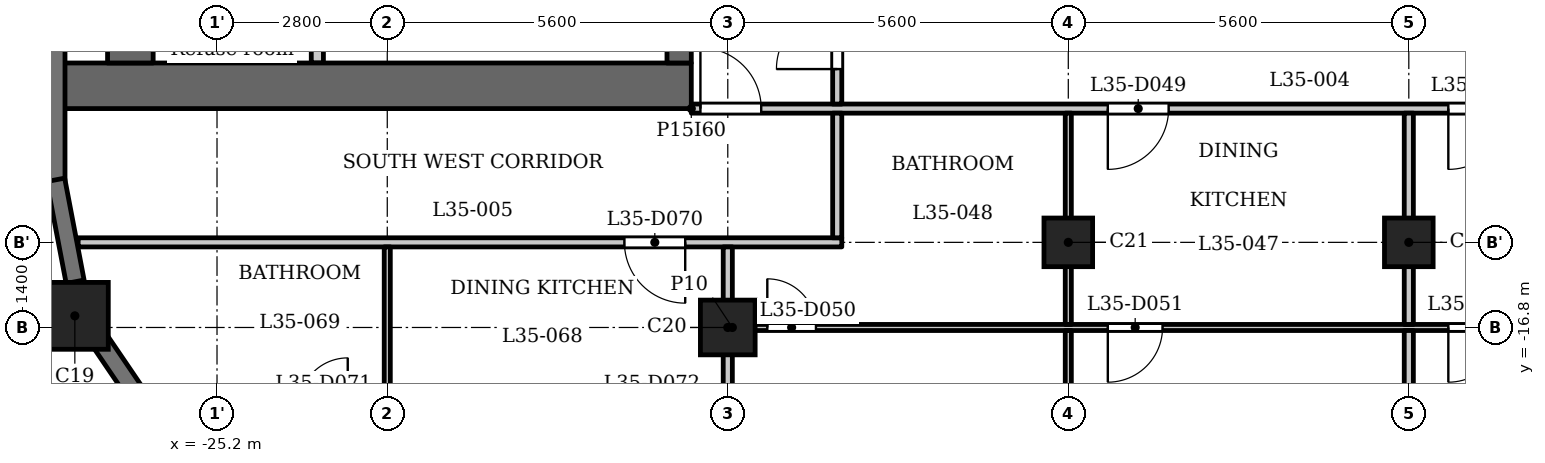
"""IFC4 building model, lengths in metres.
Left out: names, types, materials, properties, quantities, classifications, styles, units other than length and angle.
Written with IfcOpenShell. Run it as: python <this file> out.ifc"""

import sys

from ifc_helpers import new_model, si_unit, direction, frame, frame_2d, origin, origin_2d, place, context, subcontext, project, spatial, rectangle, extrude, element, fill, save


model = new_model("IFC4")
c1 = context("Model", 3, precision=1e-05, world=origin(), true_north=direction((0.0, 1.0)))
c2 = subcontext(c1, "Body", "Model", "MODEL_VIEW")
j1 = project(units=[si_unit("LENGTHUNIT", "METRE"), si_unit("PLANEANGLEUNIT", "RADIAN")], contexts=[c1])
p1 = place(None, origin())
s1 = spatial("IfcSite", under=j1, at=p1, CompositionType="ELEMENT")
p2 = place(p1, origin())
s2 = spatial("IfcBuilding", under=s1, at=p2, CompositionType="ELEMENT")
p3 = place(p2, frame((0.0, 0.0, 139.6)))
s3 = spatial("IfcBuildingStorey", under=s2, at=p3, CompositionType="ELEMENT", Elevation=139.6)
p4 = place(p3, frame((-27.538, -16.609, 0.0), z_axis=(0.0, 0.0, 1.0), x_axis=(1.0, 0.0, 0.0)))
e1 = element("IfcColumn", 1, at=p4, inside=s3, PredefinedType="COLUMN", context=c2, shape_type="SweptSolid", body=[
    extrude(rectangle(XDim=1.1, YDim=1.1, at=origin_2d()), origin(), (0.0, 0.0, 1.0), 3.5),
])
p5 = place(p3, frame((-16.8, -16.8, 0.0), z_axis=(0.0, 0.0, 1.0), x_axis=(1.0, 0.0, 0.0)))
e2 = element("IfcColumn", 2, at=p5, inside=s3, PredefinedType="COLUMN", context=c2, shape_type="SweptSolid", body=[
    extrude(rectangle(XDim=0.9, YDim=0.9, at=origin_2d()), origin(), (0.0, 0.0, 1.0), 3.5),
])
for number, where, z_axis, x_axis in (
    (3, (-11.2, -15.4, 0.0), (0.0, 0.0, 1.0), (1.0, 0.0, 0.0)),
    (4, (-5.6, -15.4, 0.0), (0.0, 0.0, 1.0), (1.0, 0.0, 0.0)),
):
    element("IfcColumn", number, at=place(p3, frame(where, z_axis=z_axis, x_axis=x_axis)), inside=s3, PredefinedType="COLUMN", context=c2, shape_type="SweptSolid", body=[
        extrude(rectangle(XDim=0.8, YDim=0.8, at=origin_2d()), origin(), (0.0, 0.0, 1.0), 3.5),
    ])
p6 = place(p3, frame((-27.85, -11.75, 0.0), z_axis=(0.0, 0.0, 1.0), x_axis=(0.0, -1.0, 0.0)))
e5 = element("IfcWall", 5, at=p6, inside=s3, PredefinedType="SOLIDWALL", context=c2, shape_type="SweptSolid", body=[
    extrude(rectangle(XDim=2.65, YDim=0.3, at=frame_2d((1.325, 0.0))), origin(), (0.0, 0.0, 1.0), 2.45),
])
p7 = place(p3, frame((-27.853, -14.372, 0.0), z_axis=(0.0, 0.0, 1.0), x_axis=(0.187302784601, -0.982302227871, 0.0)))
e6 = element("IfcWall", 6, at=p7, inside=s3, PredefinedType="SOLIDWALL", context=c2, shape_type="SweptSolid", body=[
    extrude(rectangle(XDim=1.706, YDim=0.3, at=frame_2d((0.853, 0.0))), origin(), (0.0, 0.0, 1.0), 2.45),
])
p8 = place(p3, frame((-27.138, -17.002, 0.0), z_axis=(0.0, 0.0, 1.0), x_axis=(0.562075160946, -0.827086158419, 0.0)))
e7 = element("IfcWall", 7, at=p8, inside=s3, PredefinedType="SOLIDWALL", context=c2, shape_type="SweptSolid", body=[
    extrude(rectangle(XDim=1.706, YDim=0.3, at=frame_2d((0.853, 0.0))), origin(), (0.0, 0.0, 1.0), 2.45),
])
p9 = place(p3, frame((-17.4, -12.825, 0.0), z_axis=(0.0, 0.0, 1.0), x_axis=(-1.0, 0.0, 0.0)))
e8 = element("IfcWall", 8, at=p9, inside=s3, PredefinedType="SHEAR", context=c2, shape_type="SweptSolid", body=[
    extrude(rectangle(XDim=10.4, YDim=0.75, at=frame_2d((5.2, 0.0))), origin(), (0.0, 0.0, 1.0), 3.2),
])
p10 = place(p3, frame((-17.6, -12.45, 0.0), z_axis=(0.0, 0.0, 1.0), x_axis=(0.0, 1.0, 0.0)))
e9 = element("IfcWall", 9, at=p10, inside=s3, PredefinedType="SHEAR", context=c2, shape_type="SweptSolid", body=[
    extrude(rectangle(XDim=24.9, YDim=0.4, at=frame_2d((12.45, 0.0))), origin(), (0.0, 0.0, 1.0), 3.2),
])
p11 = place(p10, frame((8.65, 0.0, 0.0)))
e10 = element("IfcOpeningElement", 10, at=p11, cuts=e9, PredefinedType="OPENING", context=c2, shape_type="SweptSolid", body=[
    extrude(rectangle(XDim=0.9, YDim=2.1, at=frame_2d((0.45, 1.05))), frame((0.0, 0.21, 0.0), z_axis=(0.0, -1.0, 0.0), x_axis=(1.0, 0.0, 0.0)), (0.0, 0.0, 1.0), 0.42),
])
p12 = place(p10, frame((15.6, 0.0, 0.0)))
e11 = element("IfcOpeningElement", 11, at=p12, cuts=e9, PredefinedType="OPENING", context=c2, shape_type="SweptSolid", body=[
    extrude(rectangle(XDim=1.1, YDim=2.1, at=frame_2d((0.55, 1.05))), frame((0.0, 0.21, 0.0), z_axis=(0.0, -1.0, 0.0), x_axis=(1.0, 0.0, 0.0)), (0.0, 0.0, 1.0), 0.42),
])
p13 = place(p10, frame((18.0, 0.0, 0.0)))
e12 = element("IfcOpeningElement", 12, at=p13, cuts=e9, PredefinedType="OPENING", context=c2, shape_type="SweptSolid", body=[
    extrude(rectangle(XDim=1.1, YDim=2.1, at=frame_2d((0.55, 1.05))), frame((0.0, 0.21, 0.0), z_axis=(0.0, -1.0, 0.0), x_axis=(1.0, 0.0, 0.0)), (0.0, 0.0, 1.0), 0.42),
])
p14 = place(p10, frame((23.025, 0.0, 0.0)))
e13 = element("IfcOpeningElement", 13, at=p14, cuts=e9, PredefinedType="OPENING", context=c2, shape_type="SweptSolid", body=[
    extrude(rectangle(XDim=1.1, YDim=2.1, at=frame_2d((0.55, 1.05))), frame((0.0, 0.21, 0.0), z_axis=(0.0, -1.0, 0.0), x_axis=(1.0, 0.0, 0.0)), (0.0, 0.0, 1.0), 0.42),
])
p15 = place(p10, frame((0.775, 0.0, 0.0)))
e14 = element("IfcOpeningElement", 14, at=p15, cuts=e9, PredefinedType="OPENING", context=c2, shape_type="SweptSolid", body=[
    extrude(rectangle(XDim=1.1, YDim=2.1, at=frame_2d((0.55, 1.05))), frame((0.0, 0.21, 0.0), z_axis=(0.0, -1.0, 0.0), x_axis=(1.0, 0.0, 0.0)), (0.0, 0.0, 1.0), 0.42),
])
p16 = place(p10, frame((12.925, 0.0, 0.0)))
e15 = element("IfcOpeningElement", 15, at=p16, cuts=e9, PredefinedType="OPENING", context=c2, shape_type="SweptSolid", body=[
    extrude(rectangle(XDim=1.8, YDim=2.1, at=frame_2d((0.9, 1.05))), frame((0.0, 0.21, 0.0), z_axis=(0.0, -1.0, 0.0), x_axis=(1.0, 0.0, 0.0)), (0.0, 0.0, 1.0), 0.42),
])
p17 = place(p3, frame((-26.625, -12.45, 0.0), z_axis=(0.0, 0.0, 1.0), x_axis=(0.0, 1.0, 0.0)))
e16 = element("IfcWall", 16, at=p17, inside=s3, PredefinedType="SHEAR", context=c2, shape_type="SweptSolid", body=[
    extrude(rectangle(XDim=24.9, YDim=0.75, at=frame_2d((12.45, 0.0))), origin(), (0.0, 0.0, 1.0), 3.2),
])
p18 = place(p3, frame((-23.55, -12.45, 0.0), z_axis=(0.0, 0.0, 1.0), x_axis=(0.0, 1.0, 0.0)))
e17 = element("IfcWall", 17, at=p18, inside=s3, PredefinedType="PARTITIONING", context=c2, shape_type="SweptSolid", body=[
    extrude(rectangle(XDim=2.65, YDim=0.2, at=frame_2d((1.325, 0.0))), origin(), (0.0, 0.0, 1.0), 3.2),
])
p19 = place(p18, frame((0.875, 0.0, 0.0)))
e18 = element("IfcOpeningElement", 18, at=p19, cuts=e17, PredefinedType="OPENING", context=c2, shape_type="SweptSolid", body=[
    extrude(rectangle(XDim=0.9, YDim=2.1, at=frame_2d((0.45, 1.05))), frame((0.0, 0.11, 0.0), z_axis=(0.0, -1.0, 0.0), x_axis=(1.0, 0.0, 0.0)), (0.0, 0.0, 1.0), 0.22),
])
p20 = place(p3, frame((-16.725, -16.8, 0.0), z_axis=(0.0, 0.0, 1.0), x_axis=(1.0, 0.0, 0.0)))
e19 = element("IfcWall", 19, at=p20, inside=s3, PredefinedType="PARTITIONING", context=c2, shape_type="SweptSolid", body=[
    extrude(rectangle(XDim=33.45, YDim=0.1, at=frame_2d((16.725, 0.0))), origin(), (0.0, 0.0, 1.0), 3.2),
])
p21 = place(p20, frame((0.575, 0.0, 0.0)))
e20 = element("IfcOpeningElement", 20, at=p21, cuts=e19, PredefinedType="OPENING", context=c2, shape_type="SweptSolid", body=[
    extrude(rectangle(XDim=0.8, YDim=2.1, at=frame_2d((0.4, 1.05))), frame((0.0, 0.06, 0.0), z_axis=(0.0, -1.0, 0.0), x_axis=(1.0, 0.0, 0.0)), (0.0, 0.0, 1.0), 0.12),
])
p22 = place(p20, frame((6.175, 0.0, 0.0)))
e21 = element("IfcOpeningElement", 21, at=p22, cuts=e19, PredefinedType="OPENING", context=c2, shape_type="SweptSolid", body=[
    extrude(rectangle(XDim=0.9, YDim=2.1, at=frame_2d((0.45, 1.05))), frame((0.0, 0.06, 0.0), z_axis=(0.0, -1.0, 0.0), x_axis=(1.0, 0.0, 0.0)), (0.0, 0.0, 1.0), 0.12),
])
p23 = place(p20, frame((15.275, 0.0, 0.0)))
e22 = element("IfcOpeningElement", 22, at=p23, cuts=e19, PredefinedType="OPENING", context=c2, shape_type="SweptSolid", body=[
    extrude(rectangle(XDim=0.8, YDim=2.1, at=frame_2d((0.4, 1.05))), frame((0.0, 0.06, 0.0), z_axis=(0.0, -1.0, 0.0), x_axis=(1.0, 0.0, 0.0)), (0.0, 0.0, 1.0), 0.12),
])
p24 = place(p20, frame((11.775, 0.0, 0.0)))
e23 = element("IfcOpeningElement", 23, at=p24, cuts=e19, PredefinedType="OPENING", context=c2, shape_type="SweptSolid", body=[
    extrude(rectangle(XDim=0.9, YDim=2.1, at=frame_2d((0.45, 1.05))), frame((0.0, 0.06, 0.0), z_axis=(0.0, -1.0, 0.0), x_axis=(1.0, 0.0, 0.0)), (0.0, 0.0, 1.0), 0.12),
])
p25 = place(p20, frame((17.275, 0.0, 0.0)))
e24 = element("IfcOpeningElement", 24, at=p25, cuts=e19, PredefinedType="OPENING", context=c2, shape_type="SweptSolid", body=[
    extrude(rectangle(XDim=0.8, YDim=2.1, at=frame_2d((0.4, 1.05))), frame((0.0, 0.06, 0.0), z_axis=(0.0, -1.0, 0.0), x_axis=(1.0, 0.0, 0.0)), (0.0, 0.0, 1.0), 0.12),
])
p26 = place(p20, frame((20.775, 0.0, 0.0)))
e25 = element("IfcOpeningElement", 25, at=p26, cuts=e19, PredefinedType="OPENING", context=c2, shape_type="SweptSolid", body=[
    extrude(rectangle(XDim=0.9, YDim=2.1, at=frame_2d((0.45, 1.05))), frame((0.0, 0.06, 0.0), z_axis=(0.0, -1.0, 0.0), x_axis=(1.0, 0.0, 0.0)), (0.0, 0.0, 1.0), 0.12),
])
p27 = place(p20, frame((31.575, 0.0, 0.0)))
e26 = element("IfcOpeningElement", 26, at=p27, cuts=e19, PredefinedType="OPENING", context=c2, shape_type="SweptSolid", body=[
    extrude(rectangle(XDim=0.8, YDim=2.1, at=frame_2d((0.4, 1.05))), frame((0.0, 0.06, 0.0), z_axis=(0.0, -1.0, 0.0), x_axis=(1.0, 0.0, 0.0)), (0.0, 0.0, 1.0), 0.12),
])
p28 = place(p20, frame((28.575, 0.0, 0.0)))
e27 = element("IfcOpeningElement", 27, at=p28, cuts=e19, PredefinedType="OPENING", context=c2, shape_type="SweptSolid", body=[
    extrude(rectangle(XDim=0.9, YDim=2.1, at=frame_2d((0.45, 1.05))), frame((0.0, 0.06, 0.0), z_axis=(0.0, -1.0, 0.0), x_axis=(1.0, 0.0, 0.0)), (0.0, 0.0, 1.0), 0.12),
])
p29 = place(p20, frame((23.725, 0.0, 0.0)))
e28 = element("IfcOpeningElement", 28, at=p29, cuts=e19, PredefinedType="OPENING", context=c2, shape_type="SweptSolid", body=[
    extrude(rectangle(XDim=0.9, YDim=2.1, at=frame_2d((0.45, 1.05))), frame((0.0, 0.06, 0.0), z_axis=(0.0, -1.0, 0.0), x_axis=(1.0, 0.0, 0.0)), (0.0, 0.0, 1.0), 0.12),
])
p30 = place(p20, frame((26.225, 0.0, 0.0)))
e29 = element("IfcOpeningElement", 29, at=p30, cuts=e19, PredefinedType="OPENING", context=c2, shape_type="SweptSolid", body=[
    extrude(rectangle(XDim=0.9, YDim=2.1, at=frame_2d((0.45, 1.05))), frame((0.0, 0.06, 0.0), z_axis=(0.0, -1.0, 0.0), x_axis=(1.0, 0.0, 0.0)), (0.0, 0.0, 1.0), 0.12),
])
p31 = place(p3, frame((-27.484, -15.4, 0.0), z_axis=(0.0, 0.0, 1.0), x_axis=(1.0, 0.0, 0.0)))
e30 = element("IfcWall", 30, at=p31, inside=s3, PredefinedType="PARTITIONING", context=c2, shape_type="SweptSolid", body=[
    extrude(rectangle(XDim=12.559, YDim=0.15, at=frame_2d((6.279, 0.0))), origin(), (0.0, 0.0, 1.0), 3.2),
])
p32 = place(p31, frame((8.984, 0.0, 0.0)))
e31 = element("IfcOpeningElement", 31, at=p32, cuts=e30, PredefinedType="OPENING", context=c2, shape_type="SweptSolid", body=[
    extrude(rectangle(XDim=1.0, YDim=2.1, at=frame_2d((0.5, 1.05))), frame((0.0, 0.085, 0.0), z_axis=(0.0, -1.0, 0.0), x_axis=(1.0, 0.0, 0.0)), (0.0, 0.0, 1.0), 0.17),
])
p33 = place(p3, frame((-17.4, -13.2, 0.0), z_axis=(0.0, 0.0, 1.0), x_axis=(1.0, 0.0, 0.0)))
e32 = element("IfcWall", 32, at=p33, inside=s3, PredefinedType="PARTITIONING", context=c2, shape_type="SweptSolid", body=[
    extrude(rectangle(XDim=34.8, YDim=0.15, at=frame_2d((17.4, 0.0))), origin(), (0.0, 0.0, 1.0), 3.2),
])
p34 = place(p33, frame((0.15, 0.0, 0.0)))
e33 = element("IfcOpeningElement", 33, at=p34, cuts=e32, PredefinedType="OPENING", context=c2, shape_type="SweptSolid", body=[
    extrude(rectangle(XDim=1.0, YDim=2.1, at=frame_2d((0.5, 1.05))), frame((0.0, 0.085, 0.0), z_axis=(0.0, -1.0, 0.0), x_axis=(1.0, 0.0, 0.0)), (0.0, 0.0, 1.0), 0.17),
])
p35 = place(p33, frame((33.55, 0.0, 0.0)))
e34 = element("IfcOpeningElement", 34, at=p35, cuts=e32, PredefinedType="OPENING", context=c2, shape_type="SweptSolid", body=[
    extrude(rectangle(XDim=1.0, YDim=2.1, at=frame_2d((0.5, 1.05))), frame((0.0, 0.085, 0.0), z_axis=(0.0, -1.0, 0.0), x_axis=(1.0, 0.0, 0.0)), (0.0, 0.0, 1.0), 0.17),
])
p36 = place(p33, frame((6.85, 0.0, 0.0)))
e35 = element("IfcOpeningElement", 35, at=p36, cuts=e32, PredefinedType="OPENING", context=c2, shape_type="SweptSolid", body=[
    extrude(rectangle(XDim=1.0, YDim=2.1, at=frame_2d((0.5, 1.05))), frame((0.0, 0.085, 0.0), z_axis=(0.0, -1.0, 0.0), x_axis=(1.0, 0.0, 0.0)), (0.0, 0.0, 1.0), 0.17),
])
p37 = place(p33, frame((12.45, 0.0, 0.0)))
e36 = element("IfcOpeningElement", 36, at=p37, cuts=e32, PredefinedType="OPENING", context=c2, shape_type="SweptSolid", body=[
    extrude(rectangle(XDim=1.0, YDim=2.1, at=frame_2d((0.5, 1.05))), frame((0.0, 0.085, 0.0), z_axis=(0.0, -1.0, 0.0), x_axis=(1.0, 0.0, 0.0)), (0.0, 0.0, 1.0), 0.17),
])
p38 = place(p33, frame((21.3, 0.0, 0.0)))
e37 = element("IfcOpeningElement", 37, at=p38, cuts=e32, PredefinedType="OPENING", context=c2, shape_type="SweptSolid", body=[
    extrude(rectangle(XDim=1.0, YDim=2.1, at=frame_2d((0.5, 1.05))), frame((0.0, 0.085, 0.0), z_axis=(0.0, -1.0, 0.0), x_axis=(1.0, 0.0, 0.0)), (0.0, 0.0, 1.0), 0.17),
])
p39 = place(p33, frame((26.9, 0.0, 0.0)))
e38 = element("IfcOpeningElement", 38, at=p39, cuts=e32, PredefinedType="OPENING", context=c2, shape_type="SweptSolid", body=[
    extrude(rectangle(XDim=1.0, YDim=2.1, at=frame_2d((0.5, 1.05))), frame((0.0, 0.085, 0.0), z_axis=(0.0, -1.0, 0.0), x_axis=(1.0, 0.0, 0.0)), (0.0, 0.0, 1.0), 0.17),
])
p40 = place(p3, frame((-22.4, -18.05, 0.0), z_axis=(0.0, 0.0, 1.0), x_axis=(0.0, 1.0, 0.0)))
e39 = element("IfcWall", 39, at=p40, inside=s3, PredefinedType="PARTITIONING", context=c2, shape_type="SweptSolid", body=[
    extrude(rectangle(XDim=2.575, YDim=0.1, at=frame_2d((1.288, 0.0))), origin(), (0.0, 0.0, 1.0), 3.2),
])
p41 = place(p3, frame((-16.8, -22.93, 0.0), z_axis=(0.0, 0.0, 1.0), x_axis=(0.0, 1.0, 0.0)))
e40 = element("IfcWall", 40, at=p41, inside=s3, PredefinedType="PARTITIONING", context=c2, shape_type="SweptSolid", body=[
    extrude(rectangle(XDim=7.455, YDim=0.15, at=frame_2d((3.728, 0.0))), origin(), (0.0, 0.0, 1.0), 3.2),
])
p42 = place(p3, frame((-15.0, -15.325, 0.0), z_axis=(0.0, 0.0, 1.0), x_axis=(0.0, 1.0, 0.0)))
e41 = element("IfcWall", 41, at=p42, inside=s3, PredefinedType="PARTITIONING", context=c2, shape_type="SweptSolid", body=[
    extrude(rectangle(XDim=2.05, YDim=0.15, at=frame_2d((1.025, 0.0))), origin(), (0.0, 0.0, 1.0), 3.2),
])
p43 = place(p3, frame((-15.0, -13.125, 0.0), z_axis=(0.0, 0.0, 1.0), x_axis=(0.0, 1.0, 0.0)))
e42 = element("IfcWall", 42, at=p43, inside=s3, PredefinedType="PARTITIONING", context=c2, shape_type="SweptSolid", body=[
    extrude(rectangle(XDim=6.356, YDim=0.15, at=frame_2d((3.178, 0.0))), origin(), (0.0, 0.0, 1.0), 3.2),
])
p44 = place(p43, frame((0.575, 0.0, 0.0)))
e43 = element("IfcOpeningElement", 43, at=p44, cuts=e42, PredefinedType="OPENING", context=c2, shape_type="SweptSolid", body=[
    extrude(rectangle(XDim=1.0, YDim=2.1, at=frame_2d((0.5, 1.05))), frame((0.0, 0.085, 0.0), z_axis=(0.0, -1.0, 0.0), x_axis=(1.0, 0.0, 0.0)), (0.0, 0.0, 1.0), 0.17),
])
p45 = place(p3, frame((-11.2, -22.93, 0.0), z_axis=(0.0, 0.0, 1.0), x_axis=(0.0, 1.0, 0.0)))
e44 = element("IfcWall", 44, at=p45, inside=s3, PredefinedType="PARTITIONING", context=c2, shape_type="SweptSolid", body=[
    extrude(rectangle(XDim=6.08, YDim=0.1, at=frame_2d((3.04, 0.0))), origin(), (0.0, 0.0, 1.0), 3.2),
])
p46 = place(p45, frame((1.33, 0.0, 0.0)))
e45 = element("IfcOpeningElement", 45, at=p46, cuts=e44, PredefinedType="OPENING", context=c2, shape_type="SweptSolid", body=[
    extrude(rectangle(XDim=0.9, YDim=2.1, at=frame_2d((0.45, 1.05))), frame((0.0, 0.06, 0.0), z_axis=(0.0, -1.0, 0.0), x_axis=(1.0, 0.0, 0.0)), (0.0, 0.0, 1.0), 0.12),
])
p47 = place(p3, frame((-11.2, -16.75, 0.0), z_axis=(0.0, 0.0, 1.0), x_axis=(0.0, 1.0, 0.0)))
e46 = element("IfcWall", 46, at=p47, inside=s3, PredefinedType="PARTITIONING", context=c2, shape_type="SweptSolid", body=[
    extrude(rectangle(XDim=3.475, YDim=0.1, at=frame_2d((1.738, 0.0))), origin(), (0.0, 0.0, 1.0), 3.2),
])
p48 = place(p3, frame((-5.6, -22.93, 0.0), z_axis=(0.0, 0.0, 1.0), x_axis=(0.0, 1.0, 0.0)))
e47 = element("IfcWall", 47, at=p48, inside=s3, PredefinedType="PARTITIONING", context=c2, shape_type="SweptSolid", body=[
    extrude(rectangle(XDim=6.08, YDim=0.15, at=frame_2d((3.04, 0.0))), origin(), (0.0, 0.0, 1.0), 3.2),
])
p49 = place(p3, frame((-5.6, -16.75, 0.0), z_axis=(0.0, 0.0, 1.0), x_axis=(0.0, 1.0, 0.0)))
e48 = element("IfcWall", 48, at=p49, inside=s3, PredefinedType="PARTITIONING", context=c2, shape_type="SweptSolid", body=[
    extrude(rectangle(XDim=3.475, YDim=0.15, at=frame_2d((1.738, 0.0))), origin(), (0.0, 0.0, 1.0), 3.2),
])
p50 = place(p44, origin())
e49 = element("IfcDoor", 49, at=p50, inside=s3, OperationType="SINGLE_SWING_RIGHT", PredefinedType="DOOR", context=c2, shape_type="SweptSolid", body=[
    extrude(rectangle(XDim=1.0, YDim=2.1, at=frame_2d((0.5, 1.05))), frame((0.0, 0.025, 0.0), z_axis=(0.0, -1.0, 0.0), x_axis=(1.0, 0.0, 0.0)), (0.0, 0.0, 1.0), 0.05),
])
fill(e43, e49)
p51 = place(p34, origin())
e50 = element("IfcDoor", 50, at=p51, inside=s3, OperationType="SINGLE_SWING_RIGHT", PredefinedType="DOOR", context=c2, shape_type="SweptSolid", body=[
    extrude(rectangle(XDim=1.0, YDim=2.1, at=frame_2d((0.5, 1.05))), frame((0.0, 0.025, 0.0), z_axis=(0.0, -1.0, 0.0), x_axis=(1.0, 0.0, 0.0)), (0.0, 0.0, 1.0), 0.05),
])
fill(e33, e50)
p52 = place(p36, origin())
e51 = element("IfcDoor", 51, at=p52, inside=s3, OperationType="SINGLE_SWING_LEFT", PredefinedType="DOOR", context=c2, shape_type="SweptSolid", body=[
    extrude(rectangle(XDim=1.0, YDim=2.1, at=frame_2d((0.5, 1.05))), frame((0.0, 0.025, 0.0), z_axis=(0.0, -1.0, 0.0), x_axis=(1.0, 0.0, 0.0)), (0.0, 0.0, 1.0), 0.05),
])
fill(e35, e51)
p53 = place(p21, origin())
e52 = element("IfcDoor", 52, at=p53, inside=s3, OperationType="SINGLE_SWING_RIGHT", PredefinedType="DOOR", context=c2, shape_type="SweptSolid", body=[
    extrude(rectangle(XDim=0.8, YDim=2.1, at=frame_2d((0.4, 1.05))), frame((0.0, 0.025, 0.0), z_axis=(0.0, -1.0, 0.0), x_axis=(1.0, 0.0, 0.0)), (0.0, 0.0, 1.0), 0.05),
])
fill(e20, e52)
p54 = place(p22, origin())
e53 = element("IfcDoor", 53, at=p54, inside=s3, OperationType="SINGLE_SWING_LEFT", PredefinedType="DOOR", context=c2, shape_type="SweptSolid", body=[
    extrude(rectangle(XDim=0.9, YDim=2.1, at=frame_2d((0.45, 1.05))), frame((0.0, 0.025, 0.0), z_axis=(0.0, -1.0, 0.0), x_axis=(1.0, 0.0, 0.0)), (0.0, 0.0, 1.0), 0.05),
])
fill(e21, e53)
p55 = place(p37, origin())
e54 = element("IfcDoor", 54, at=p55, inside=s3, OperationType="SINGLE_SWING_LEFT", PredefinedType="DOOR", context=c2, shape_type="SweptSolid", body=[
    extrude(rectangle(XDim=1.0, YDim=2.1, at=frame_2d((0.5, 1.05))), frame((0.0, 0.025, 0.0), z_axis=(0.0, -1.0, 0.0), x_axis=(1.0, 0.0, 0.0)), (0.0, 0.0, 1.0), 0.05),
])
fill(e36, e54)
p56 = place(p24, origin())
e55 = element("IfcDoor", 55, at=p56, inside=s3, OperationType="SINGLE_SWING_LEFT", PredefinedType="DOOR", context=c2, shape_type="SweptSolid", body=[
    extrude(rectangle(XDim=0.9, YDim=2.1, at=frame_2d((0.45, 1.05))), frame((0.0, 0.025, 0.0), z_axis=(0.0, -1.0, 0.0), x_axis=(1.0, 0.0, 0.0)), (0.0, 0.0, 1.0), 0.05),
])
fill(e23, e55)
p57 = place(p32, origin())
e56 = element("IfcDoor", 56, at=p57, inside=s3, OperationType="SINGLE_SWING_RIGHT", PredefinedType="DOOR", context=c2, shape_type="SweptSolid", body=[
    extrude(rectangle(XDim=1.0, YDim=2.1, at=frame_2d((0.5, 1.05))), frame((0.0, 0.025, 0.0), z_axis=(0.0, -1.0, 0.0), x_axis=(1.0, 0.0, 0.0)), (0.0, 0.0, 1.0), 0.05),
])
fill(e31, e56)
save(model, sys.argv[1])
